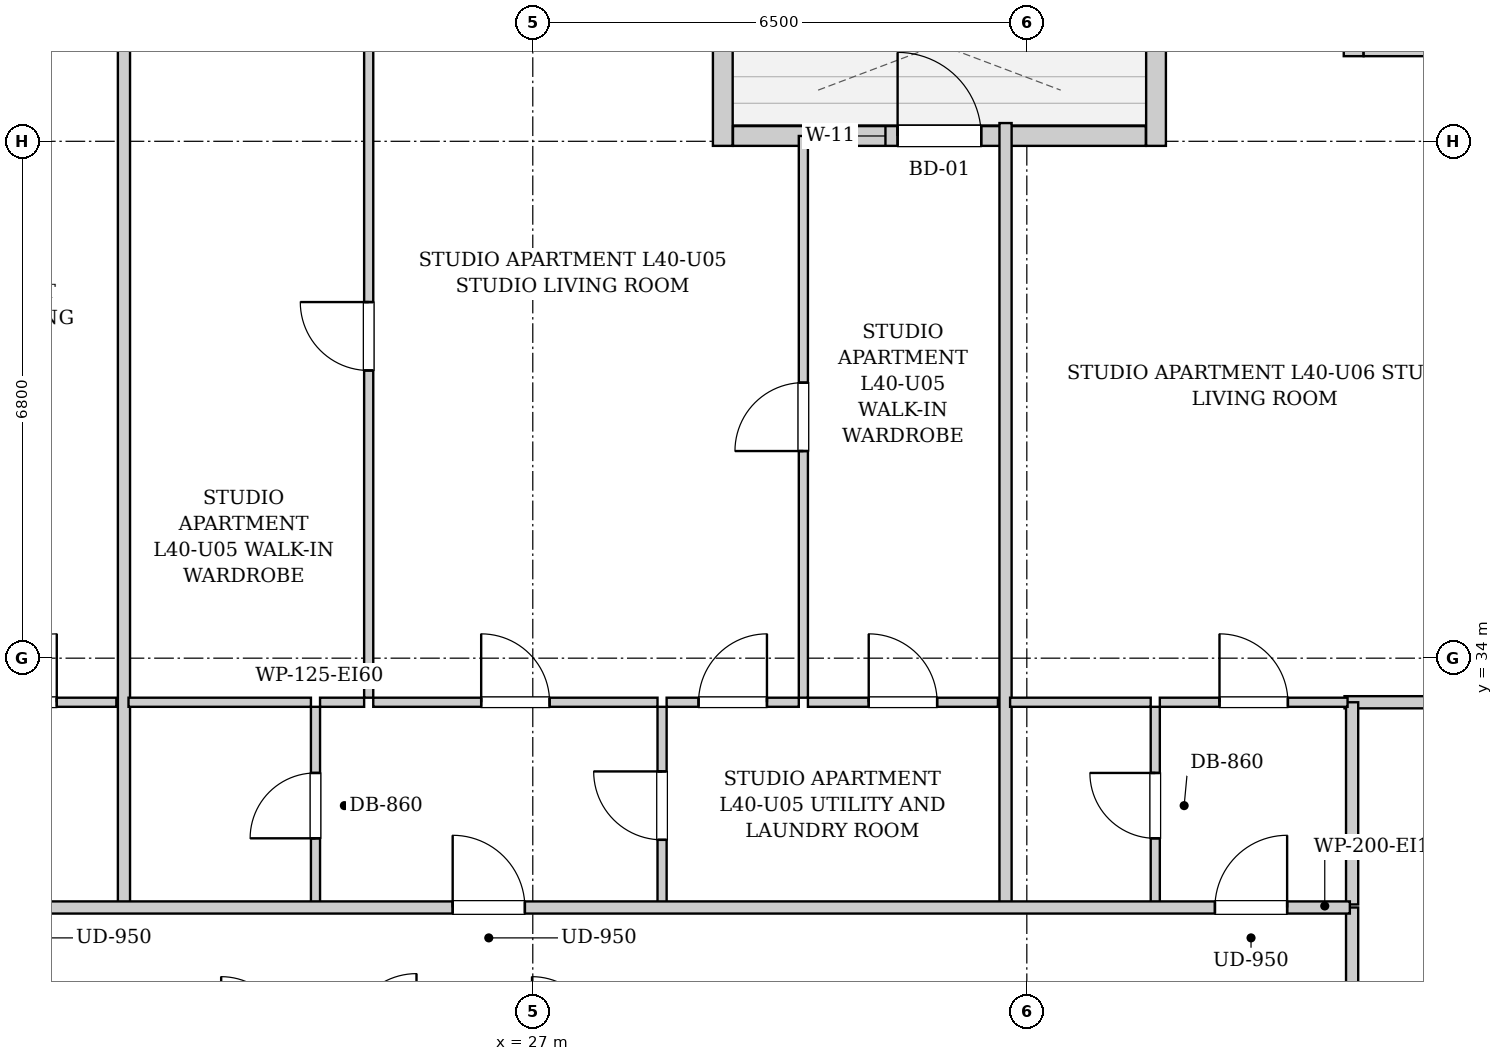
"""IFC4 building model, lengths in metres.
Left out: names, types, materials, properties, quantities, classifications, styles, units other than length and angle.
Written with IfcOpenShell. Run it as: python <this file> out.ifc"""

import sys

from ifc_helpers import new_model, si_unit, direction, frame, frame_2d, origin, place, context, subcontext, project, spatial, rectangle, extrude, element, fill, save


model = new_model("IFC4")
c1 = context("Model", 3, precision=1e-05, world=origin(), true_north=direction((0.0, 1.0)))
c2 = subcontext(c1, "Body", "Model", "MODEL_VIEW")
j1 = project(units=[si_unit("LENGTHUNIT", "METRE"), si_unit("PLANEANGLEUNIT", "RADIAN")], contexts=[c1])
p1 = place(None, origin())
s1 = spatial("IfcSite", under=j1, at=p1, CompositionType="ELEMENT")
p2 = place(p1, origin())
s2 = spatial("IfcBuilding", under=s1, at=p2, CompositionType="ELEMENT")
p3 = place(p2, frame((0.0, 0.0, 140.65)))
s3 = spatial("IfcBuildingStorey", under=s2, at=p3, CompositionType="ELEMENT", Elevation=140.65)
p4 = place(p3, frame((29.5, 43.14, 0.0), z_axis=(0.0, 0.0, 1.0), x_axis=(0.0, -1.0, 0.0)))
e1 = element("IfcWall", 1, at=p4, inside=s3, PredefinedType="SOLIDWALL", context=c2, shape_type="SweptSolid", body=[
    extrude(rectangle(XDim=2.4, YDim=0.26, at=frame_2d((1.2, 0.0))), origin(), (0.0, 0.0, 1.0), 2.99),
])
p5 = place(p3, frame((29.634, 40.87, 0.0), z_axis=(0.0, 0.0, 1.0), x_axis=(1.0, 0.0, 0.0)))
e2 = element("IfcWall", 2, at=p5, inside=s3, PredefinedType="SOLIDWALL", context=c2, shape_type="SweptSolid", body=[
    extrude(rectangle(XDim=5.432, YDim=0.26, at=frame_2d((2.716, 0.0))), origin(), (0.0, 0.0, 1.0), 2.99),
])
p6 = place(p5, frame((2.166, 0.0, 0.0)))
e3 = element("IfcOpeningElement", 3, at=p6, cuts=e2, PredefinedType="OPENING", context=c2, shape_type="SweptSolid", body=[
    extrude(rectangle(XDim=1.1, YDim=2.0, at=frame_2d((0.55, 1.0))), frame((0.0, 0.14, 0.0), z_axis=(0.0, -1.0, 0.0), x_axis=(1.0, 0.0, 0.0)), (0.0, 0.0, 1.0), 0.28),
])
p7 = place(p5, frame((1.156, 0.0, 0.55)))
e4 = element("IfcOpeningElement", 4, at=p7, cuts=e2, PredefinedType="OPENING", context=c2, shape_type="SweptSolid", body=[
    extrude(rectangle(XDim=0.85, YDim=1.2, at=frame_2d((0.425, 0.6))), frame((0.0, 0.14, 0.0), z_axis=(0.0, -1.0, 0.0), x_axis=(1.0, 0.0, 0.0)), (0.0, 0.0, 1.0), 0.28),
])
p8 = place(p3, frame((35.2, 40.74, 0.0), z_axis=(0.0, 0.0, 1.0), x_axis=(0.0, 1.0, 0.0)))
e5 = element("IfcWall", 5, at=p8, inside=s3, PredefinedType="SOLIDWALL", context=c2, shape_type="SweptSolid", body=[
    extrude(rectangle(XDim=2.4, YDim=0.26, at=frame_2d((1.2, 0.0))), origin(), (0.0, 0.0, 1.0), 2.99),
])
p9 = place(p3, frame((37.8, 42.998, 0.0), z_axis=(0.0, 0.0, 1.0), x_axis=(0.0, -1.0, 0.0)))
e6 = element("IfcWall", 6, at=p9, inside=s3, PredefinedType="SOLIDWALL", context=c2, shape_type="SweptSolid", body=[
    extrude(rectangle(XDim=1.078, YDim=0.26, at=frame_2d((0.539, 0.0))), origin(), (0.0, 0.0, 1.0), 2.99),
])
p10 = place(p3, frame((37.932, 42.05, 0.0), z_axis=(0.0, 0.0, 1.0), x_axis=(1.0, 0.0, 0.0)))
e7 = element("IfcWall", 7, at=p10, inside=s3, PredefinedType="SOLIDWALL", context=c2, shape_type="SweptSolid", body=[
    extrude(rectangle(XDim=1.248, YDim=0.26, at=frame_2d((0.624, 0.0))), origin(), (0.0, 0.0, 1.0), 2.99),
])
p11 = place(p3, frame((37.78, 28.98, 0.0), z_axis=(0.0, 0.0, 1.0), x_axis=(0.0, 1.0, 0.0)))
e8 = element("IfcWall", 8, at=p11, inside=s3, PredefinedType="PARTITIONING", context=c2, shape_type="SweptSolid", body=[
    extrude(rectangle(XDim=1.74, YDim=0.16, at=frame_2d((0.87, 0.0))), origin(), (0.0, 0.0, 1.0), 2.99),
])
p12 = place(p3, frame((19.054, 33.42, 0.0), z_axis=(0.0, 0.0, 1.0), x_axis=(1.0, 0.0, 0.0)))
e9 = element("IfcWall", 9, at=p12, inside=s3, PredefinedType="PARTITIONING", context=c2, shape_type="SweptSolid", body=[
    extrude(rectangle(XDim=2.467, YDim=0.12, at=frame_2d((1.233, 0.0))), origin(), (0.0, 0.0, 1.0), 2.99),
])
p13 = place(p12, frame((0.783, 0.0, 0.0)))
e10 = element("IfcOpeningElement", 10, at=p13, cuts=e9, PredefinedType="OPENING", context=c2, shape_type="SweptSolid", body=[
    extrude(rectangle(XDim=0.9, YDim=2.05, at=frame_2d((0.45, 1.025))), frame((0.0, 0.07, 0.0), z_axis=(0.0, -1.0, 0.0), x_axis=(1.0, 0.0, 0.0)), (0.0, 0.0, 1.0), 0.14),
])
p14 = place(p3, frame((21.621, 30.76, 0.0), z_axis=(0.0, 0.0, 1.0), x_axis=(0.0, 1.0, 0.0)))
e11 = element("IfcWall", 11, at=p14, inside=s3, PredefinedType="PARTITIONING", context=c2, shape_type="SweptSolid", body=[
    extrude(rectangle(XDim=12.26, YDim=0.16, at=frame_2d((6.13, 0.0))), origin(), (0.0, 0.0, 1.0), 2.99),
])
p15 = place(p3, frame((24.141, 30.76, 0.0), z_axis=(0.0, 0.0, 1.0), x_axis=(0.0, 1.0, 0.0)))
e12 = element("IfcWall", 12, at=p15, inside=s3, PredefinedType="PARTITIONING", context=c2, shape_type="SweptSolid", body=[
    extrude(rectangle(XDim=2.6, YDim=0.12, at=frame_2d((1.3, 0.0))), origin(), (0.0, 0.0, 1.0), 2.99),
])
p16 = place(p15, frame((0.87, 0.0, 0.0)))
e13 = element("IfcOpeningElement", 13, at=p16, cuts=e12, PredefinedType="OPENING", context=c2, shape_type="SweptSolid", body=[
    extrude(rectangle(XDim=0.86, YDim=2.05, at=frame_2d((0.43, 1.025))), frame((0.0, 0.07, 0.0), z_axis=(0.0, -1.0, 0.0), x_axis=(1.0, 0.0, 0.0)), (0.0, 0.0, 1.0), 0.14),
])
p17 = place(p3, frame((21.681, 33.42, 0.0), z_axis=(0.0, 0.0, 1.0), x_axis=(1.0, 0.0, 0.0)))
e14 = element("IfcWall", 14, at=p17, inside=s3, PredefinedType="PARTITIONING", context=c2, shape_type="SweptSolid", body=[
    extrude(rectangle(XDim=2.4, YDim=0.12, at=frame_2d((1.2, 0.0))), origin(), (0.0, 0.0, 1.0), 2.99),
])
p18 = place(p3, frame((28.701, 30.76, 0.0), z_axis=(0.0, 0.0, 1.0), x_axis=(0.0, 1.0, 0.0)))
e15 = element("IfcWall", 15, at=p18, inside=s3, PredefinedType="PARTITIONING", context=c2, shape_type="SweptSolid", body=[
    extrude(rectangle(XDim=2.6, YDim=0.12, at=frame_2d((1.3, 0.0))), origin(), (0.0, 0.0, 1.0), 2.99),
])
p19 = place(p18, frame((0.85, 0.0, 0.0)))
e16 = element("IfcOpeningElement", 16, at=p19, cuts=e15, PredefinedType="OPENING", context=c2, shape_type="SweptSolid", body=[
    extrude(rectangle(XDim=0.9, YDim=2.05, at=frame_2d((0.45, 1.025))), frame((0.0, 0.07, 0.0), z_axis=(0.0, -1.0, 0.0), x_axis=(1.0, 0.0, 0.0)), (0.0, 0.0, 1.0), 0.14),
])
p20 = place(p3, frame((24.201, 33.42, 0.0), z_axis=(0.0, 0.0, 1.0), x_axis=(1.0, 0.0, 0.0)))
e17 = element("IfcWall", 17, at=p20, inside=s3, PredefinedType="PARTITIONING", context=c2, shape_type="SweptSolid", body=[
    extrude(rectangle(XDim=0.58, YDim=0.12, at=frame_2d((0.29, 0.0))), origin(), (0.0, 0.0, 1.0), 2.99),
])
p21 = place(p3, frame((24.901, 33.42, 0.0), z_axis=(0.0, 0.0, 1.0), x_axis=(1.0, 0.0, 0.0)))
e18 = element("IfcWall", 18, at=p21, inside=s3, PredefinedType="PARTITIONING", context=c2, shape_type="SweptSolid", body=[
    extrude(rectangle(XDim=3.74, YDim=0.12, at=frame_2d((1.87, 0.0))), origin(), (0.0, 0.0, 1.0), 2.99),
])
p22 = place(p21, frame((1.42, 0.0, 0.0)))
e19 = element("IfcOpeningElement", 19, at=p22, cuts=e18, PredefinedType="OPENING", context=c2, shape_type="SweptSolid", body=[
    extrude(rectangle(XDim=0.9, YDim=2.05, at=frame_2d((0.45, 1.025))), frame((0.0, 0.07, 0.0), z_axis=(0.0, -1.0, 0.0), x_axis=(1.0, 0.0, 0.0)), (0.0, 0.0, 1.0), 0.14),
])
p23 = place(p3, frame((28.761, 33.42, 0.0), z_axis=(0.0, 0.0, 1.0), x_axis=(1.0, 0.0, 0.0)))
e20 = element("IfcWall", 20, at=p23, inside=s3, PredefinedType="PARTITIONING", context=c2, shape_type="SweptSolid", body=[
    extrude(rectangle(XDim=1.739, YDim=0.12, at=frame_2d((0.87, 0.0))), origin(), (0.0, 0.0, 1.0), 2.99),
])
p24 = place(p23, frame((0.42, 0.0, 0.0)))
e21 = element("IfcOpeningElement", 21, at=p24, cuts=e20, PredefinedType="OPENING", context=c2, shape_type="SweptSolid", body=[
    extrude(rectangle(XDim=0.9, YDim=2.05, at=frame_2d((0.45, 1.025))), frame((0.0, 0.07, 0.0), z_axis=(0.0, -1.0, 0.0), x_axis=(1.0, 0.0, 0.0)), (0.0, 0.0, 1.0), 0.14),
])
p25 = place(p3, frame((30.62, 33.42, 0.0), z_axis=(0.0, 0.0, 1.0), x_axis=(1.0, 0.0, 0.0)))
e22 = element("IfcWall", 22, at=p25, inside=s3, PredefinedType="PARTITIONING", context=c2, shape_type="SweptSolid", body=[
    extrude(rectangle(XDim=2.5, YDim=0.12, at=frame_2d((1.25, 0.0))), origin(), (0.0, 0.0, 1.0), 2.99),
])
p26 = place(p25, frame((0.8, 0.0, 0.0)))
e23 = element("IfcOpeningElement", 23, at=p26, cuts=e22, PredefinedType="OPENING", context=c2, shape_type="SweptSolid", body=[
    extrude(rectangle(XDim=0.9, YDim=2.05, at=frame_2d((0.45, 1.025))), frame((0.0, 0.07, 0.0), z_axis=(0.0, -1.0, 0.0), x_axis=(1.0, 0.0, 0.0)), (0.0, 0.0, 1.0), 0.14),
])
p27 = place(p3, frame((24.841, 33.48, 0.0), z_axis=(0.0, 0.0, 1.0), x_axis=(0.0, 1.0, 0.0)))
e24 = element("IfcWall", 24, at=p27, inside=s3, PredefinedType="PARTITIONING", context=c2, shape_type="SweptSolid", body=[
    extrude(rectangle(XDim=9.54, YDim=0.12, at=frame_2d((4.77, 0.0))), origin(), (0.0, 0.0, 1.0), 2.99),
])
p28 = place(p27, frame((4.305, 0.0, 0.0)))
e25 = element("IfcOpeningElement", 25, at=p28, cuts=e24, PredefinedType="OPENING", context=c2, shape_type="SweptSolid", body=[
    extrude(rectangle(XDim=0.9, YDim=2.05, at=frame_2d((0.45, 1.025))), frame((0.0, 0.07, 0.0), z_axis=(0.0, -1.0, 0.0), x_axis=(1.0, 0.0, 0.0)), (0.0, 0.0, 1.0), 0.14),
])
p29 = place(p3, frame((30.56, 33.48, 0.0), z_axis=(0.0, 0.0, 1.0), x_axis=(0.0, 1.0, 0.0)))
e26 = element("IfcWall", 26, at=p29, inside=s3, PredefinedType="PARTITIONING", context=c2, shape_type="SweptSolid", body=[
    extrude(rectangle(XDim=7.39, YDim=0.12, at=frame_2d((3.695, 0.0))), origin(), (0.0, 0.0, 1.0), 2.99),
])
p30 = place(p29, frame((3.245, 0.0, 0.0)))
e27 = element("IfcOpeningElement", 27, at=p30, cuts=e26, PredefinedType="OPENING", context=c2, shape_type="SweptSolid", body=[
    extrude(rectangle(XDim=0.9, YDim=2.05, at=frame_2d((0.45, 1.025))), frame((0.0, 0.07, 0.0), z_axis=(0.0, -1.0, 0.0), x_axis=(1.0, 0.0, 0.0)), (0.0, 0.0, 1.0), 0.14),
])
p31 = place(p3, frame((37.68, 33.42, 0.0), z_axis=(0.0, 0.0, 1.0), x_axis=(1.0, 0.0, 0.0)))
e28 = element("IfcWall", 28, at=p31, inside=s3, PredefinedType="PARTITIONING", context=c2, shape_type="SweptSolid", body=[
    extrude(rectangle(XDim=2.34, YDim=0.16, at=frame_2d((1.17, 0.0))), origin(), (0.0, 0.0, 1.0), 2.99),
])
p32 = place(p3, frame((37.78, 30.76, 0.0), z_axis=(0.0, 0.0, 1.0), x_axis=(0.0, 1.0, 0.0)))
e29 = element("IfcWall", 29, at=p32, inside=s3, PredefinedType="PARTITIONING", context=c2, shape_type="SweptSolid", body=[
    extrude(rectangle(XDim=2.66, YDim=0.16, at=frame_2d((1.33, 0.0))), origin(), (0.0, 0.0, 1.0), 2.99),
])
p33 = place(p3, frame((33.22, 30.76, 0.0), z_axis=(0.0, 0.0, 1.0), x_axis=(0.0, 1.0, 0.0)))
e30 = element("IfcWall", 30, at=p33, inside=s3, PredefinedType="PARTITIONING", context=c2, shape_type="SweptSolid", body=[
    extrude(rectangle(XDim=10.28, YDim=0.16, at=frame_2d((5.14, 0.0))), origin(), (0.0, 0.0, 1.0), 2.426),
])
p34 = place(p3, frame((35.19, 30.76, 0.0), z_axis=(0.0, 0.0, 1.0), x_axis=(0.0, 1.0, 0.0)))
e31 = element("IfcWall", 31, at=p34, inside=s3, PredefinedType="PARTITIONING", context=c2, shape_type="SweptSolid", body=[
    extrude(rectangle(XDim=2.6, YDim=0.12, at=frame_2d((1.3, 0.0))), origin(), (0.0, 0.0, 1.0), 2.99),
])
p35 = place(p34, frame((0.87, 0.0, 0.0)))
e32 = element("IfcOpeningElement", 32, at=p35, cuts=e31, PredefinedType="OPENING", context=c2, shape_type="SweptSolid", body=[
    extrude(rectangle(XDim=0.86, YDim=2.05, at=frame_2d((0.43, 1.025))), frame((0.0, 0.07, 0.0), z_axis=(0.0, -1.0, 0.0), x_axis=(1.0, 0.0, 0.0)), (0.0, 0.0, 1.0), 0.14),
])
p36 = place(p3, frame((33.28, 33.42, 0.0), z_axis=(0.0, 0.0, 1.0), x_axis=(1.0, 0.0, 0.0)))
e33 = element("IfcWall", 33, at=p36, inside=s3, PredefinedType="PARTITIONING", context=c2, shape_type="SweptSolid", body=[
    extrude(rectangle(XDim=1.85, YDim=0.12, at=frame_2d((0.925, 0.0))), origin(), (0.0, 0.0, 1.0), 2.99),
])
p37 = place(p3, frame((35.25, 33.42, 0.0), z_axis=(0.0, 0.0, 1.0), x_axis=(1.0, 0.0, 0.0)))
e34 = element("IfcWall", 34, at=p37, inside=s3, PredefinedType="PARTITIONING", context=c2, shape_type="SweptSolid", body=[
    extrude(rectangle(XDim=2.47, YDim=0.12, at=frame_2d((1.235, 0.0))), origin(), (0.0, 0.0, 1.0), 2.99),
])
p38 = place(p37, frame((0.785, 0.0, 0.0)))
e35 = element("IfcOpeningElement", 35, at=p38, cuts=e34, PredefinedType="OPENING", context=c2, shape_type="SweptSolid", body=[
    extrude(rectangle(XDim=0.9, YDim=2.05, at=frame_2d((0.45, 1.025))), frame((0.0, 0.07, 0.0), z_axis=(0.0, -1.0, 0.0), x_axis=(1.0, 0.0, 0.0)), (0.0, 0.0, 1.0), 0.14),
])
p39 = place(p3, frame((10.05, 30.72, 0.0), z_axis=(0.0, 0.0, 1.0), x_axis=(1.0, 0.0, 0.0)))
e36 = element("IfcWall", 36, at=p39, inside=s3, PredefinedType="PARTITIONING", context=c2, shape_type="SweptSolid", body=[
    extrude(rectangle(XDim=27.7, YDim=0.16, at=frame_2d((13.85, 0.0))), origin(), (0.0, 0.0, 1.0), 2.99),
])
p40 = place(p39, frame((4.063, 0.0, 0.0)))
e37 = element("IfcOpeningElement", 37, at=p40, cuts=e36, PredefinedType="OPENING", context=c2, shape_type="SweptSolid", body=[
    extrude(rectangle(XDim=0.95, YDim=2.1, at=frame_2d((0.475, 1.05))), frame((0.0, 0.09, 0.0), z_axis=(0.0, -1.0, 0.0), x_axis=(1.0, 0.0, 0.0)), (0.0, 0.0, 1.0), 0.18),
])
p41 = place(p39, frame((9.515, 0.0, 0.0)))
e38 = element("IfcOpeningElement", 38, at=p41, cuts=e36, PredefinedType="OPENING", context=c2, shape_type="SweptSolid", body=[
    extrude(rectangle(XDim=0.95, YDim=2.1, at=frame_2d((0.475, 1.05))), frame((0.0, 0.09, 0.0), z_axis=(0.0, -1.0, 0.0), x_axis=(1.0, 0.0, 0.0)), (0.0, 0.0, 1.0), 0.18),
])
p42 = place(p39, frame((15.896, 0.0, 0.0)))
e39 = element("IfcOpeningElement", 39, at=p42, cuts=e36, PredefinedType="OPENING", context=c2, shape_type="SweptSolid", body=[
    extrude(rectangle(XDim=0.95, YDim=2.1, at=frame_2d((0.475, 1.05))), frame((0.0, 0.09, 0.0), z_axis=(0.0, -1.0, 0.0), x_axis=(1.0, 0.0, 0.0)), (0.0, 0.0, 1.0), 0.18),
])
p43 = place(p39, frame((25.925, 0.0, 0.0)))
e40 = element("IfcOpeningElement", 40, at=p43, cuts=e36, PredefinedType="OPENING", context=c2, shape_type="SweptSolid", body=[
    extrude(rectangle(XDim=0.95, YDim=2.1, at=frame_2d((0.475, 1.05))), frame((0.0, 0.09, 0.0), z_axis=(0.0, -1.0, 0.0), x_axis=(1.0, 0.0, 0.0)), (0.0, 0.0, 1.0), 0.18),
])
p44 = place(p13, origin())
e41 = element("IfcDoor", 41, at=p44, inside=s3, OperationType="SINGLE_SWING_RIGHT", PredefinedType="DOOR", context=c2, shape_type="SweptSolid", body=[
    extrude(rectangle(XDim=0.9, YDim=2.05, at=frame_2d((0.45, 1.025))), frame((0.0, 0.025, 0.0), z_axis=(0.0, -1.0, 0.0), x_axis=(1.0, 0.0, 0.0)), (0.0, 0.0, 1.0), 0.05),
])
fill(e10, e41)
p45 = place(p16, origin())
e42 = element("IfcDoor", 42, at=p45, inside=s3, OperationType="SINGLE_SWING_LEFT", PredefinedType="DOOR", context=c2, shape_type="SweptSolid", body=[
    extrude(rectangle(XDim=0.86, YDim=2.05, at=frame_2d((0.43, 1.025))), frame((0.0, 0.025, 0.0), z_axis=(0.0, -1.0, 0.0), x_axis=(1.0, 0.0, 0.0)), (0.0, 0.0, 1.0), 0.05),
])
fill(e13, e42)
p46 = place(p19, origin())
e43 = element("IfcDoor", 43, at=p46, inside=s3, OperationType="SINGLE_SWING_RIGHT", PredefinedType="DOOR", context=c2, shape_type="SweptSolid", body=[
    extrude(rectangle(XDim=0.9, YDim=2.05, at=frame_2d((0.45, 1.025))), frame((0.0, 0.025, 0.0), z_axis=(0.0, -1.0, 0.0), x_axis=(1.0, 0.0, 0.0)), (0.0, 0.0, 1.0), 0.05),
])
fill(e16, e43)
p47 = place(p22, origin())
e44 = element("IfcDoor", 44, at=p47, inside=s3, OperationType="SINGLE_SWING_LEFT", PredefinedType="DOOR", context=c2, shape_type="SweptSolid", body=[
    extrude(rectangle(XDim=0.9, YDim=2.05, at=frame_2d((0.45, 1.025))), frame((0.0, 0.025, 0.0), z_axis=(0.0, -1.0, 0.0), x_axis=(1.0, 0.0, 0.0)), (0.0, 0.0, 1.0), 0.05),
])
fill(e19, e44)
p48 = place(p24, origin())
e45 = element("IfcDoor", 45, at=p48, inside=s3, OperationType="SINGLE_SWING_RIGHT", PredefinedType="DOOR", context=c2, shape_type="SweptSolid", body=[
    extrude(rectangle(XDim=0.9, YDim=2.05, at=frame_2d((0.45, 1.025))), frame((0.0, 0.025, 0.0), z_axis=(0.0, -1.0, 0.0), x_axis=(1.0, 0.0, 0.0)), (0.0, 0.0, 1.0), 0.05),
])
fill(e21, e45)
p49 = place(p26, origin())
e46 = element("IfcDoor", 46, at=p49, inside=s3, OperationType="SINGLE_SWING_LEFT", PredefinedType="DOOR", context=c2, shape_type="SweptSolid", body=[
    extrude(rectangle(XDim=0.9, YDim=2.05, at=frame_2d((0.45, 1.025))), frame((0.0, 0.025, 0.0), z_axis=(0.0, -1.0, 0.0), x_axis=(1.0, 0.0, 0.0)), (0.0, 0.0, 1.0), 0.05),
])
fill(e23, e46)
p50 = place(p28, origin())
e47 = element("IfcDoor", 47, at=p50, inside=s3, OperationType="SINGLE_SWING_RIGHT", PredefinedType="DOOR", context=c2, shape_type="SweptSolid", body=[
    extrude(rectangle(XDim=0.9, YDim=2.05, at=frame_2d((0.45, 1.025))), frame((0.0, 0.025, 0.0), z_axis=(0.0, -1.0, 0.0), x_axis=(1.0, 0.0, 0.0)), (0.0, 0.0, 1.0), 0.05),
])
fill(e25, e47)
p51 = place(p30, origin())
e48 = element("IfcDoor", 48, at=p51, inside=s3, OperationType="SINGLE_SWING_LEFT", PredefinedType="DOOR", context=c2, shape_type="SweptSolid", body=[
    extrude(rectangle(XDim=0.9, YDim=2.05, at=frame_2d((0.45, 1.025))), frame((0.0, 0.025, 0.0), z_axis=(0.0, -1.0, 0.0), x_axis=(1.0, 0.0, 0.0)), (0.0, 0.0, 1.0), 0.05),
])
fill(e27, e48)
p52 = place(p35, origin())
e49 = element("IfcDoor", 49, at=p52, inside=s3, OperationType="SINGLE_SWING_RIGHT", PredefinedType="DOOR", context=c2, shape_type="SweptSolid", body=[
    extrude(rectangle(XDim=0.86, YDim=2.05, at=frame_2d((0.43, 1.025))), frame((0.0, 0.025, 0.0), z_axis=(0.0, -1.0, 0.0), x_axis=(1.0, 0.0, 0.0)), (0.0, 0.0, 1.0), 0.05),
])
fill(e32, e49)
p53 = place(p38, origin())
e50 = element("IfcDoor", 50, at=p53, inside=s3, OperationType="SINGLE_SWING_LEFT", PredefinedType="DOOR", context=c2, shape_type="SweptSolid", body=[
    extrude(rectangle(XDim=0.9, YDim=2.05, at=frame_2d((0.45, 1.025))), frame((0.0, 0.025, 0.0), z_axis=(0.0, -1.0, 0.0), x_axis=(1.0, 0.0, 0.0)), (0.0, 0.0, 1.0), 0.05),
])
fill(e35, e50)
p54 = place(p42, origin())
e51 = element("IfcDoor", 51, at=p54, inside=s3, OperationType="SINGLE_SWING_LEFT", PredefinedType="DOOR", context=c2, shape_type="SweptSolid", body=[
    extrude(rectangle(XDim=0.95, YDim=2.1, at=frame_2d((0.475, 1.05))), frame((0.0, 0.025, 0.0), z_axis=(0.0, -1.0, 0.0), x_axis=(1.0, 0.0, 0.0)), (0.0, 0.0, 1.0), 0.05),
])
fill(e39, e51)
p55 = place(p43, origin())
e52 = element("IfcDoor", 52, at=p55, inside=s3, OperationType="SINGLE_SWING_RIGHT", PredefinedType="DOOR", context=c2, shape_type="SweptSolid", body=[
    extrude(rectangle(XDim=0.95, YDim=2.1, at=frame_2d((0.475, 1.05))), frame((0.0, 0.025, 0.0), z_axis=(0.0, -1.0, 0.0), x_axis=(1.0, 0.0, 0.0)), (0.0, 0.0, 1.0), 0.05),
])
fill(e40, e52)
p56 = place(p6, origin())
e53 = element("IfcDoor", 53, at=p56, inside=s3, OperationType="SINGLE_SWING_LEFT", PredefinedType="DOOR", context=c2, shape_type="SweptSolid", body=[
    extrude(rectangle(XDim=1.1, YDim=2.0, at=frame_2d((0.55, 1.0))), frame((0.0, 0.025, 0.0), z_axis=(0.0, -1.0, 0.0), x_axis=(1.0, 0.0, 0.0)), (0.0, 0.0, 1.0), 0.05),
])
fill(e3, e53)
p57 = place(p7, origin())
e54 = element("IfcWindow", 54, at=p57, inside=s3, PartitioningType="SINGLE_PANEL", PredefinedType="WINDOW", context=c2, shape_type="SweptSolid", body=[
    extrude(rectangle(XDim=0.85, YDim=1.2, at=frame_2d((0.425, 0.6))), frame((0.0, 0.03, 0.0), z_axis=(0.0, -1.0, 0.0), x_axis=(1.0, 0.0, 0.0)), (0.0, 0.0, 1.0), 0.06),
])
fill(e4, e54)
save(model, sys.argv[1])
